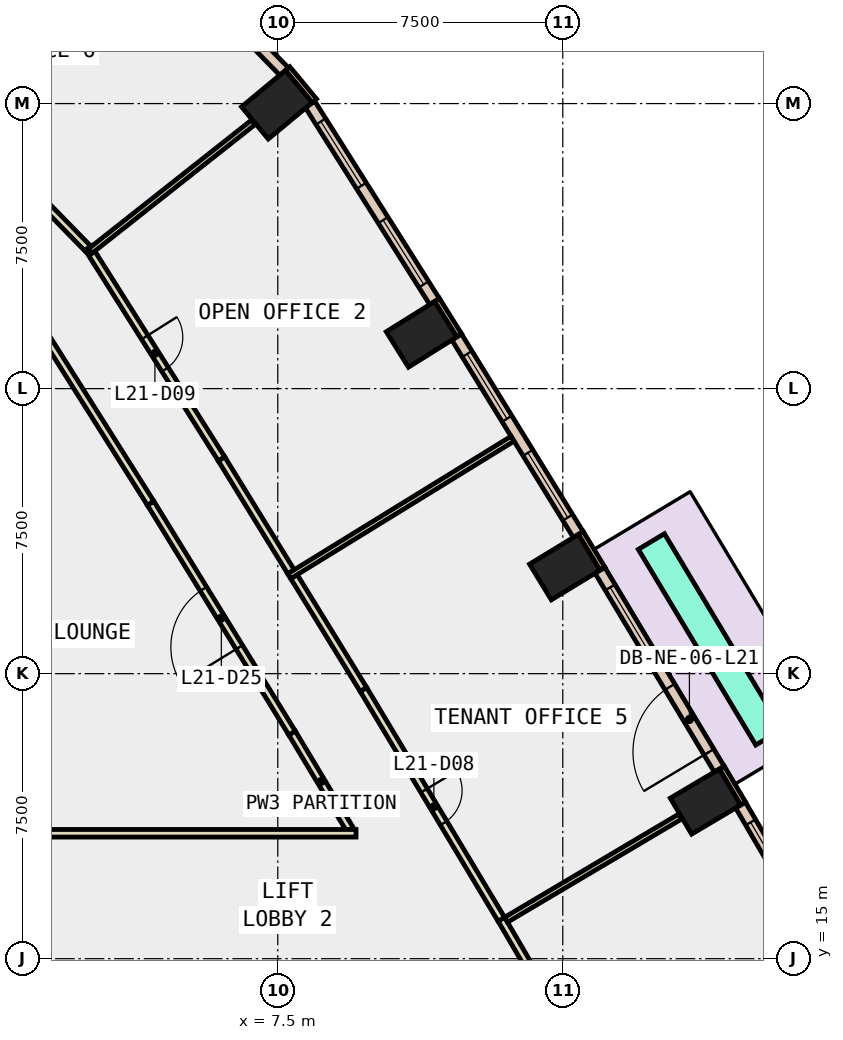
"""IFC4 building model, lengths in metres.
Left out: names, types, materials, properties, quantities, classifications, styles, units other than length and angle.
Written with IfcOpenShell. Run it as: python <this file> out.ifc"""

import sys

from ifc_helpers import new_model, si_unit, direction, frame, frame_2d, origin, origin_2d, place, context, subcontext, project, spatial, rectangle, extrude, element, fill, save


model = new_model("IFC4")
c1 = context("Model", 3, precision=1e-05, world=origin(), true_north=direction((0.0, 1.0)))
c2 = subcontext(c1, "Body", "Model", "MODEL_VIEW")
j1 = project(units=[si_unit("LENGTHUNIT", "METRE"), si_unit("PLANEANGLEUNIT", "RADIAN")], contexts=[c1])
p1 = place(None, origin())
s1 = spatial("IfcSite", under=j1, at=p1, CompositionType="ELEMENT")
p2 = place(p1, origin())
s2 = spatial("IfcBuilding", under=s1, at=p2, CompositionType="ELEMENT")
p3 = place(p2, frame((0.0, 0.0, 99.2)))
s3 = spatial("IfcBuildingStorey", under=s2, at=p3, CompositionType="ELEMENT", Elevation=99.2)
for number, where, z_axis, x_axis in (
    (1, (18.755, 19.134, -0.4), (0.0, 0.0, 1.0), (-0.51, 0.86, 0.0)),
    (2, (15.053, 25.302, -0.4), (0.0, 0.0, 1.0), (-0.52, 0.854, 0.0)),
    (3, (11.283, 31.428, -0.4), (0.0, 0.0, 1.0), (-0.53, 0.848, 0.0)),
    (4, (7.476, 37.47, -0.4), (0.0, 0.0, 1.0), (-0.638, 0.77, 0.0)),
):
    element("IfcColumn", number, at=place(p3, frame(where, z_axis=z_axis, x_axis=x_axis)), inside=s3, PredefinedType="COLUMN", context=c2, shape_type="SweptSolid", body=[
        extrude(rectangle(XDim=1.1, YDim=1.5, at=origin_2d()), origin(), (0.0, 0.0, 1.0), 4.2),
    ])
p4 = place(p3, frame((19.745, 19.082, 0.0), z_axis=(0.0, 0.0, 1.0), x_axis=(-0.510082245696, 0.860125631885, 0.0)))
e5 = element("IfcWall", 5, at=p4, inside=s3, PredefinedType="STANDARD", context=c2, shape_type="SweptSolid", body=[
    extrude(rectangle(XDim=1.1, YDim=0.15, at=frame_2d((0.55, 0.0))), origin(), (0.0, 0.0, 1.0), 3.8),
])
for number, where, z_axis, x_axis in (
    (6, (16.044, 25.261, 0.0), (0.0, 0.0, 1.0), (-0.52, 0.854, 0.0)),
    (7, (12.274, 31.399, 0.0), (0.0, 0.0, 1.0), (-0.53, 0.848, 0.0)),
):
    element("IfcWall", number, at=place(p3, frame(where, z_axis=z_axis, x_axis=x_axis)), inside=s3, PredefinedType="STANDARD", context=c2, shape_type="SweptSolid", body=[
        extrude(rectangle(XDim=1.1, YDim=0.15, at=frame_2d((0.55, 0.0))), origin(), (0.0, 0.0, 1.0), 3.8),
    ])
p5 = place(p3, frame((8.462, 37.574, 0.0), z_axis=(0.0, 0.0, 1.0), x_axis=(-0.638544483078, 0.769584916127, 0.0)))
e8 = element("IfcWall", 8, at=p5, inside=s3, PredefinedType="STANDARD", context=c2, shape_type="SweptSolid", body=[
    extrude(rectangle(XDim=1.099, YDim=0.15, at=frame_2d((0.55, 0.0))), origin(), (0.0, 0.0, 1.0), 3.8),
])
p6 = place(p3, frame((22.759, 13.774, 0.0), z_axis=(0.0, 0.0, 1.0), x_axis=(-0.50490018297, 0.863177736759, 0.0)))
e9 = element("IfcWall", 9, at=p6, inside=s3, PredefinedType="STANDARD", context=c2, shape_type="SweptSolid", body=[
    extrude(rectangle(XDim=6.104, YDim=0.3, at=frame_2d((3.052, 0.0))), origin(), (0.0, 0.0, 1.0), 3.8),
])
p7 = place(p6, frame((0.526, 0.0, 0.9)))
e10 = element("IfcOpeningElement", 10, at=p7, cuts=e9, PredefinedType="OPENING", context=c2, shape_type="SweptSolid", body=[
    extrude(rectangle(XDim=2.0, YDim=2.6, at=frame_2d((1.0, 1.3))), frame((0.0, 0.16, 0.0), z_axis=(0.0, -1.0, 0.0), x_axis=(1.0, 0.0, 0.0)), (0.0, 0.0, 1.0), 0.32),
])
p8 = place(p6, frame((3.578, 0.0, 0.9)))
e11 = element("IfcOpeningElement", 11, at=p8, cuts=e9, PredefinedType="OPENING", context=c2, shape_type="SweptSolid", body=[
    extrude(rectangle(XDim=2.0, YDim=2.6, at=frame_2d((1.0, 1.3))), frame((0.0, 0.16, 0.0), z_axis=(0.0, -1.0, 0.0), x_axis=(1.0, 0.0, 0.0)), (0.0, 0.0, 1.0), 0.32),
])
p9 = place(p3, frame((19.117, 19.987, 0.0), z_axis=(0.0, 0.0, 1.0), x_axis=(-0.514560454873, 0.857454102726, 0.0)))
e12 = element("IfcWall", 12, at=p9, inside=s3, PredefinedType="STANDARD", context=c2, shape_type="SweptSolid", body=[
    extrude(rectangle(XDim=6.104, YDim=0.3, at=frame_2d((3.052, 0.0))), origin(), (0.0, 0.0, 1.0), 3.8),
])
p10 = place(p9, frame((0.526, 0.0, 0.0)))
e13 = element("IfcOpeningElement", 13, at=p10, cuts=e12, PredefinedType="OPENING", context=c2, shape_type="SweptSolid", body=[
    extrude(rectangle(XDim=2.0, YDim=2.4, at=frame_2d((1.0, 1.2))), frame((0.0, 0.16, 0.0), z_axis=(0.0, -1.0, 0.0), x_axis=(1.0, 0.0, 0.0)), (0.0, 0.0, 1.0), 0.32),
])
p11 = place(p9, frame((3.578, 0.0, 0.9)))
e14 = element("IfcOpeningElement", 14, at=p11, cuts=e12, PredefinedType="OPENING", context=c2, shape_type="SweptSolid", body=[
    extrude(rectangle(XDim=2.0, YDim=2.6, at=frame_2d((1.0, 1.3))), frame((0.0, 0.16, 0.0), z_axis=(0.0, -1.0, 0.0), x_axis=(1.0, 0.0, 0.0)), (0.0, 0.0, 1.0), 0.32),
])
p12 = place(p3, frame((15.406, 26.16, 0.0), z_axis=(0.0, 0.0, 1.0), x_axis=(-0.524121974895, 0.851643208998, 0.0)))
e15 = element("IfcWall", 15, at=p12, inside=s3, PredefinedType="STANDARD", context=c2, shape_type="SweptSolid", body=[
    extrude(rectangle(XDim=6.104, YDim=0.3, at=frame_2d((3.052, 0.0))), origin(), (0.0, 0.0, 1.0), 3.8),
])
p13 = place(p12, frame((0.526, 0.0, 0.9)))
e16 = element("IfcOpeningElement", 16, at=p13, cuts=e15, PredefinedType="OPENING", context=c2, shape_type="SweptSolid", body=[
    extrude(rectangle(XDim=2.0, YDim=2.6, at=frame_2d((1.0, 1.3))), frame((0.0, 0.16, 0.0), z_axis=(0.0, -1.0, 0.0), x_axis=(1.0, 0.0, 0.0)), (0.0, 0.0, 1.0), 0.32),
])
p14 = place(p12, frame((3.578, 0.0, 0.9)))
e17 = element("IfcOpeningElement", 17, at=p14, cuts=e15, PredefinedType="OPENING", context=c2, shape_type="SweptSolid", body=[
    extrude(rectangle(XDim=2.0, YDim=2.6, at=frame_2d((1.0, 1.3))), frame((0.0, 0.16, 0.0), z_axis=(0.0, -1.0, 0.0), x_axis=(1.0, 0.0, 0.0)), (0.0, 0.0, 1.0), 0.32),
])
p15 = place(p3, frame((11.626, 32.29, 0.0), z_axis=(0.0, 0.0, 1.0), x_axis=(-0.534018429465, 0.845472836342, 0.0)))
e18 = element("IfcWall", 18, at=p15, inside=s3, PredefinedType="STANDARD", context=c2, shape_type="SweptSolid", body=[
    extrude(rectangle(XDim=6.138, YDim=0.3, at=frame_2d((3.069, 0.0))), origin(), (0.0, 0.0, 1.0), 3.8),
])
p16 = place(p15, frame((0.535, 0.0, 0.9)))
e19 = element("IfcOpeningElement", 19, at=p16, cuts=e18, PredefinedType="OPENING", context=c2, shape_type="SweptSolid", body=[
    extrude(rectangle(XDim=2.0, YDim=2.6, at=frame_2d((1.0, 1.3))), frame((0.0, 0.16, 0.0), z_axis=(0.0, -1.0, 0.0), x_axis=(1.0, 0.0, 0.0)), (0.0, 0.0, 1.0), 0.32),
])
p17 = place(p15, frame((3.604, 0.0, 0.9)))
e20 = element("IfcOpeningElement", 20, at=p17, cuts=e18, PredefinedType="OPENING", context=c2, shape_type="SweptSolid", body=[
    extrude(rectangle(XDim=2.0, YDim=2.6, at=frame_2d((1.0, 1.3))), frame((0.0, 0.16, 0.0), z_axis=(0.0, -1.0, 0.0), x_axis=(1.0, 0.0, 0.0)), (0.0, 0.0, 1.0), 0.32),
])
p18 = place(p3, frame((7.668, 38.343, 0.0), z_axis=(0.0, 0.0, 1.0), x_axis=(-0.698695735804, 0.715418946331, 0.0)))
e21 = element("IfcWall", 21, at=p18, inside=s3, PredefinedType="STANDARD", context=c2, shape_type="SweptSolid", body=[
    extrude(rectangle(XDim=3.65, YDim=0.3, at=frame_2d((1.825, 0.0))), origin(), (0.0, 0.0, 1.0), 3.8),
])
p19 = place(p18, frame((1.125, 0.0, 0.9)))
e22 = element("IfcOpeningElement", 22, at=p19, cuts=e21, PredefinedType="OPENING", context=c2, shape_type="SweptSolid", body=[
    extrude(rectangle(XDim=1.4, YDim=2.6, at=frame_2d((0.7, 1.3))), frame((0.0, 0.16, 0.0), z_axis=(0.0, -1.0, 0.0), x_axis=(1.0, 0.0, 0.0)), (0.0, 0.0, 1.0), 0.32),
])
p20 = place(p3, frame((20.421, 20.828, 0.0), z_axis=(0.0, 0.0, 1.0), x_axis=(-0.514609363357, 0.857424750719, 0.0)))
e23 = element("IfcWall", 23, at=p20, inside=s3, PredefinedType="STANDARD", context=c2, shape_type="SweptSolid", body=[
    extrude(rectangle(XDim=6.004, YDim=0.8, at=frame_2d((3.002, 0.0))), origin(), (0.0, 0.0, 1.0), 0.8),
])
p21 = place(p3, frame((9.407, 18.386, 0.0), z_axis=(0.0, 0.0, 1.0), x_axis=(-0.514399309837, 0.857550785691, 0.0)))
e24 = element("IfcWall", 24, at=p21, inside=s3, PredefinedType="PARTITIONING", context=c2, shape_type="SweptSolid", body=[
    extrude(rectangle(XDim=2.978, YDim=0.2, at=frame_2d((1.489, 0.0))), origin(), (0.0, 0.0, 1.0), 3.8),
])
p22 = place(p3, frame((7.875, 20.94, 0.0), z_axis=(0.0, 0.0, 1.0), x_axis=(-0.524183774504, 0.851605172921, 0.0)))
e25 = element("IfcWall", 25, at=p22, inside=s3, PredefinedType="PARTITIONING", context=c2, shape_type="SweptSolid", body=[
    extrude(rectangle(XDim=7.099, YDim=0.2, at=frame_2d((3.549, 0.0))), origin(), (0.0, 0.0, 1.0), 3.8),
])
p23 = place(p22, frame((2.649, 0.0, 0.0)))
e26 = element("IfcOpeningElement", 26, at=p23, cuts=e25, PredefinedType="OPENING", context=c2, shape_type="SweptSolid", body=[
    extrude(rectangle(XDim=1.8, YDim=2.1, at=frame_2d((0.9, 1.05))), frame((0.0, 0.11, 0.0), z_axis=(0.0, -1.0, 0.0), x_axis=(1.0, 0.0, 0.0)), (0.0, 0.0, 1.0), 0.22),
])
p24 = place(p3, frame((4.154, 26.985, 0.0), z_axis=(0.0, 0.0, 1.0), x_axis=(-0.53384777413, 0.84558060175, 0.0)))
e27 = element("IfcWall", 27, at=p24, inside=s3, PredefinedType="PARTITIONING", context=c2, shape_type="SweptSolid", body=[
    extrude(rectangle(XDim=6.326, YDim=0.2, at=frame_2d((3.163, 0.0))), origin(), (0.0, 0.0, 1.0), 3.8),
])
p25 = place(p3, frame((13.383, 16.039, 0.0), z_axis=(0.0, 0.0, 1.0), x_axis=(0.504806221623, -0.863232690884, 0.0)))
e28 = element("IfcWall", 28, at=p25, inside=s3, PredefinedType="PARTITIONING", context=c2, shape_type="SweptSolid", body=[
    extrude(rectangle(XDim=7.124, YDim=0.2, at=frame_2d((3.562, 0.0))), origin(), (0.0, 0.0, 1.0), 3.8),
])
p26 = place(p25, frame((3.137, 0.0, 0.0)))
e29 = element("IfcOpeningElement", 29, at=p26, cuts=e28, PredefinedType="OPENING", context=c2, shape_type="SweptSolid", body=[
    extrude(rectangle(XDim=1.0, YDim=2.1, at=frame_2d((0.5, 1.05))), frame((0.0, 0.11, 0.0), z_axis=(0.0, -1.0, 0.0), x_axis=(1.0, 0.0, 0.0)), (0.0, 0.0, 1.0), 0.22),
])
p27 = place(p3, frame((7.927, 25.052, 0.0), z_axis=(0.0, 0.0, 1.0), x_axis=(0.524140390501, -0.851631875311, 0.0)))
e30 = element("IfcWall", 30, at=p27, inside=s3, PredefinedType="PARTITIONING", context=c2, shape_type="SweptSolid", body=[
    extrude(rectangle(XDim=3.487, YDim=0.2, at=frame_2d((1.744, 0.0))), origin(), (0.0, 0.0, 1.0), 3.8),
])
p28 = place(p3, frame((9.755, 22.082, 0.0), z_axis=(0.0, 0.0, 1.0), x_axis=(0.514582342012, -0.857440967816, 0.0)))
e31 = element("IfcWall", 31, at=p28, inside=s3, PredefinedType="PARTITIONING", context=c2, shape_type="SweptSolid", body=[
    extrude(rectangle(XDim=7.049, YDim=0.2, at=frame_2d((3.524, 0.0))), origin(), (0.0, 0.0, 1.0), 3.8),
])
p29 = place(p28, frame((3.1, 0.0, 0.0)))
e32 = element("IfcOpeningElement", 32, at=p29, cuts=e31, PredefinedType="OPENING", context=c2, shape_type="SweptSolid", body=[
    extrude(rectangle(XDim=1.0, YDim=2.1, at=frame_2d((0.5, 1.05))), frame((0.0, 0.11, 0.0), z_axis=(0.0, -1.0, 0.0), x_axis=(1.0, 0.0, 0.0)), (0.0, 0.0, 1.0), 0.22),
])
p30 = place(p3, frame((2.513, 33.705, 0.0), z_axis=(0.0, 0.0, 1.0), x_axis=(0.533874165031, -0.845563939577, 0.0)))
e33 = element("IfcWall", 33, at=p30, inside=s3, PredefinedType="PARTITIONING", context=c2, shape_type="SweptSolid", body=[
    extrude(rectangle(XDim=6.571, YDim=0.2, at=frame_2d((3.286, 0.0))), origin(), (0.0, 0.0, 1.0), 3.8),
])
p31 = place(p30, frame((2.785, 0.0, 0.0)))
e34 = element("IfcOpeningElement", 34, at=p31, cuts=e33, PredefinedType="OPENING", context=c2, shape_type="SweptSolid", body=[
    extrude(rectangle(XDim=1.0, YDim=2.1, at=frame_2d((0.5, 1.05))), frame((0.0, 0.11, 0.0), z_axis=(0.0, -1.0, 0.0), x_axis=(1.0, 0.0, 0.0)), (0.0, 0.0, 1.0), 0.22),
])
p32 = place(p3, frame((6.021, 28.149, 0.0), z_axis=(0.0, 0.0, 1.0), x_axis=(0.524062258075, -0.851679957297, 0.0)))
e35 = element("IfcWall", 35, at=p32, inside=s3, PredefinedType="PARTITIONING", context=c2, shape_type="SweptSolid", body=[
    extrude(rectangle(XDim=3.486, YDim=0.2, at=frame_2d((1.743, 0.0))), origin(), (0.0, 0.0, 1.0), 3.8),
])
p33 = place(p3, frame((0.983, 35.241, 0.0), z_axis=(0.0, 0.0, 1.0), x_axis=(0.698771726105, -0.715344724449, 0.0)))
e36 = element("IfcWall", 36, at=p33, inside=s3, PredefinedType="PARTITIONING", context=c2, shape_type="SweptSolid", body=[
    extrude(rectangle(XDim=2.166, YDim=0.2, at=frame_2d((1.083, 0.0))), origin(), (0.0, 0.0, 1.0), 3.8),
])
p34 = place(p3, frame((13.507, 16.025, 0.0), z_axis=(0.0, 0.0, 1.0), x_axis=(0.860289301319, 0.509806157315, 0.0)))
e37 = element("IfcWall", 37, at=p34, inside=s3, PredefinedType="PARTITIONING", context=c2, shape_type="SweptSolid", body=[
    extrude(rectangle(XDim=5.33, YDim=0.15, at=frame_2d((2.665, 0.0))), origin(), (0.0, 0.0, 1.0), 3.8),
])
p35 = place(p3, frame((7.802, 25.064, 0.0), z_axis=(0.0, 0.0, 1.0), x_axis=(0.851596352662, 0.524198103901, 0.0)))
e38 = element("IfcWall", 38, at=p35, inside=s3, PredefinedType="PARTITIONING", context=c2, shape_type="SweptSolid", body=[
    extrude(rectangle(XDim=6.9, YDim=0.15, at=frame_2d((3.45, 0.0))), origin(), (0.0, 0.0, 1.0), 3.8),
])
p36 = place(p3, frame((2.566, 33.62, 0.0), z_axis=(0.0, 0.0, 1.0), x_axis=(0.784838195876, 0.619700739304, 0.0)))
e39 = element("IfcWall", 39, at=p36, inside=s3, PredefinedType="PARTITIONING", context=c2, shape_type="SweptSolid", body=[
    extrude(rectangle(XDim=5.469, YDim=0.15, at=frame_2d((2.734, 0.0))), origin(), (0.0, 0.0, 1.0), 3.8),
])
p37 = place(p3, frame((0.4, 18.3, 0.0), z_axis=(0.0, 0.0, 1.0), x_axis=(1.0, 0.0, 0.0)))
e40 = element("IfcWall", 40, at=p37, inside=s3, PredefinedType="PARTITIONING", context=c2, shape_type="SweptSolid", body=[
    extrude(rectangle(XDim=9.159, YDim=0.2, at=frame_2d((4.58, 0.0))), origin(), (0.0, 0.0, 1.0), 3.8),
])
p38 = place(p8, origin())
e41 = element("IfcWindow", 41, at=p38, inside=s3, PartitioningType="SINGLE_PANEL", PredefinedType="WINDOW", context=c2, shape_type="SweptSolid", body=[
    extrude(rectangle(XDim=2.0, YDim=2.6, at=frame_2d((1.0, 1.3))), frame((0.0, 0.03, 0.0), z_axis=(0.0, -1.0, 0.0), x_axis=(1.0, 0.0, 0.0)), (0.0, 0.0, 1.0), 0.06),
])
fill(e11, e41)
p39 = place(p10, origin())
e42 = element("IfcDoor", 42, at=p39, inside=s3, OperationType="SLIDING_TO_LEFT", PredefinedType="DOOR", context=c2, shape_type="SweptSolid", body=[
    extrude(rectangle(XDim=2.0, YDim=2.4, at=frame_2d((1.0, 1.2))), frame((0.0, 0.025, 0.0), z_axis=(0.0, -1.0, 0.0), x_axis=(1.0, 0.0, 0.0)), (0.0, 0.0, 1.0), 0.05),
])
fill(e13, e42)
p40 = place(p11, origin())
e43 = element("IfcWindow", 43, at=p40, inside=s3, PartitioningType="SINGLE_PANEL", PredefinedType="WINDOW", context=c2, shape_type="SweptSolid", body=[
    extrude(rectangle(XDim=2.0, YDim=2.6, at=frame_2d((1.0, 1.3))), frame((0.0, 0.03, 0.0), z_axis=(0.0, -1.0, 0.0), x_axis=(1.0, 0.0, 0.0)), (0.0, 0.0, 1.0), 0.06),
])
fill(e14, e43)
p41 = place(p13, origin())
e44 = element("IfcWindow", 44, at=p41, inside=s3, PartitioningType="SINGLE_PANEL", PredefinedType="WINDOW", context=c2, shape_type="SweptSolid", body=[
    extrude(rectangle(XDim=2.0, YDim=2.6, at=frame_2d((1.0, 1.3))), frame((0.0, 0.03, 0.0), z_axis=(0.0, -1.0, 0.0), x_axis=(1.0, 0.0, 0.0)), (0.0, 0.0, 1.0), 0.06),
])
fill(e16, e44)
p42 = place(p14, origin())
e45 = element("IfcWindow", 45, at=p42, inside=s3, PartitioningType="SINGLE_PANEL", PredefinedType="WINDOW", context=c2, shape_type="SweptSolid", body=[
    extrude(rectangle(XDim=2.0, YDim=2.6, at=frame_2d((1.0, 1.3))), frame((0.0, 0.03, 0.0), z_axis=(0.0, -1.0, 0.0), x_axis=(1.0, 0.0, 0.0)), (0.0, 0.0, 1.0), 0.06),
])
fill(e17, e45)
p43 = place(p16, origin())
e46 = element("IfcWindow", 46, at=p43, inside=s3, PartitioningType="SINGLE_PANEL", PredefinedType="WINDOW", context=c2, shape_type="SweptSolid", body=[
    extrude(rectangle(XDim=2.0, YDim=2.6, at=frame_2d((1.0, 1.3))), frame((0.0, 0.03, 0.0), z_axis=(0.0, -1.0, 0.0), x_axis=(1.0, 0.0, 0.0)), (0.0, 0.0, 1.0), 0.06),
])
fill(e19, e46)
p44 = place(p17, origin())
e47 = element("IfcWindow", 47, at=p44, inside=s3, PartitioningType="SINGLE_PANEL", PredefinedType="WINDOW", context=c2, shape_type="SweptSolid", body=[
    extrude(rectangle(XDim=2.0, YDim=2.6, at=frame_2d((1.0, 1.3))), frame((0.0, 0.03, 0.0), z_axis=(0.0, -1.0, 0.0), x_axis=(1.0, 0.0, 0.0)), (0.0, 0.0, 1.0), 0.06),
])
fill(e20, e47)
p45 = place(p29, origin())
e48 = element("IfcDoor", 48, at=p45, inside=s3, OperationType="SINGLE_SWING_LEFT", PredefinedType="DOOR", context=c2, shape_type="SweptSolid", body=[
    extrude(rectangle(XDim=1.0, YDim=2.1, at=frame_2d((0.5, 1.05))), frame((0.0, 0.025, 0.0), z_axis=(0.0, -1.0, 0.0), x_axis=(1.0, 0.0, 0.0)), (0.0, 0.0, 1.0), 0.05),
])
fill(e32, e48)
p46 = place(p31, origin())
e49 = element("IfcDoor", 49, at=p46, inside=s3, OperationType="SINGLE_SWING_LEFT", PredefinedType="DOOR", context=c2, shape_type="SweptSolid", body=[
    extrude(rectangle(XDim=1.0, YDim=2.1, at=frame_2d((0.5, 1.05))), frame((0.0, 0.025, 0.0), z_axis=(0.0, -1.0, 0.0), x_axis=(1.0, 0.0, 0.0)), (0.0, 0.0, 1.0), 0.05),
])
fill(e34, e49)
p47 = place(p23, origin())
e50 = element("IfcDoor", 50, at=p47, inside=s3, OperationType="DOUBLE_DOOR_SINGLE_SWING", PredefinedType="DOOR", context=c2, shape_type="SweptSolid", body=[
    extrude(rectangle(XDim=1.8, YDim=2.1, at=frame_2d((0.9, 1.05))), frame((0.0, 0.025, 0.0), z_axis=(0.0, -1.0, 0.0), x_axis=(1.0, 0.0, 0.0)), (0.0, 0.0, 1.0), 0.05),
])
fill(e26, e50)
save(model, sys.argv[1])
